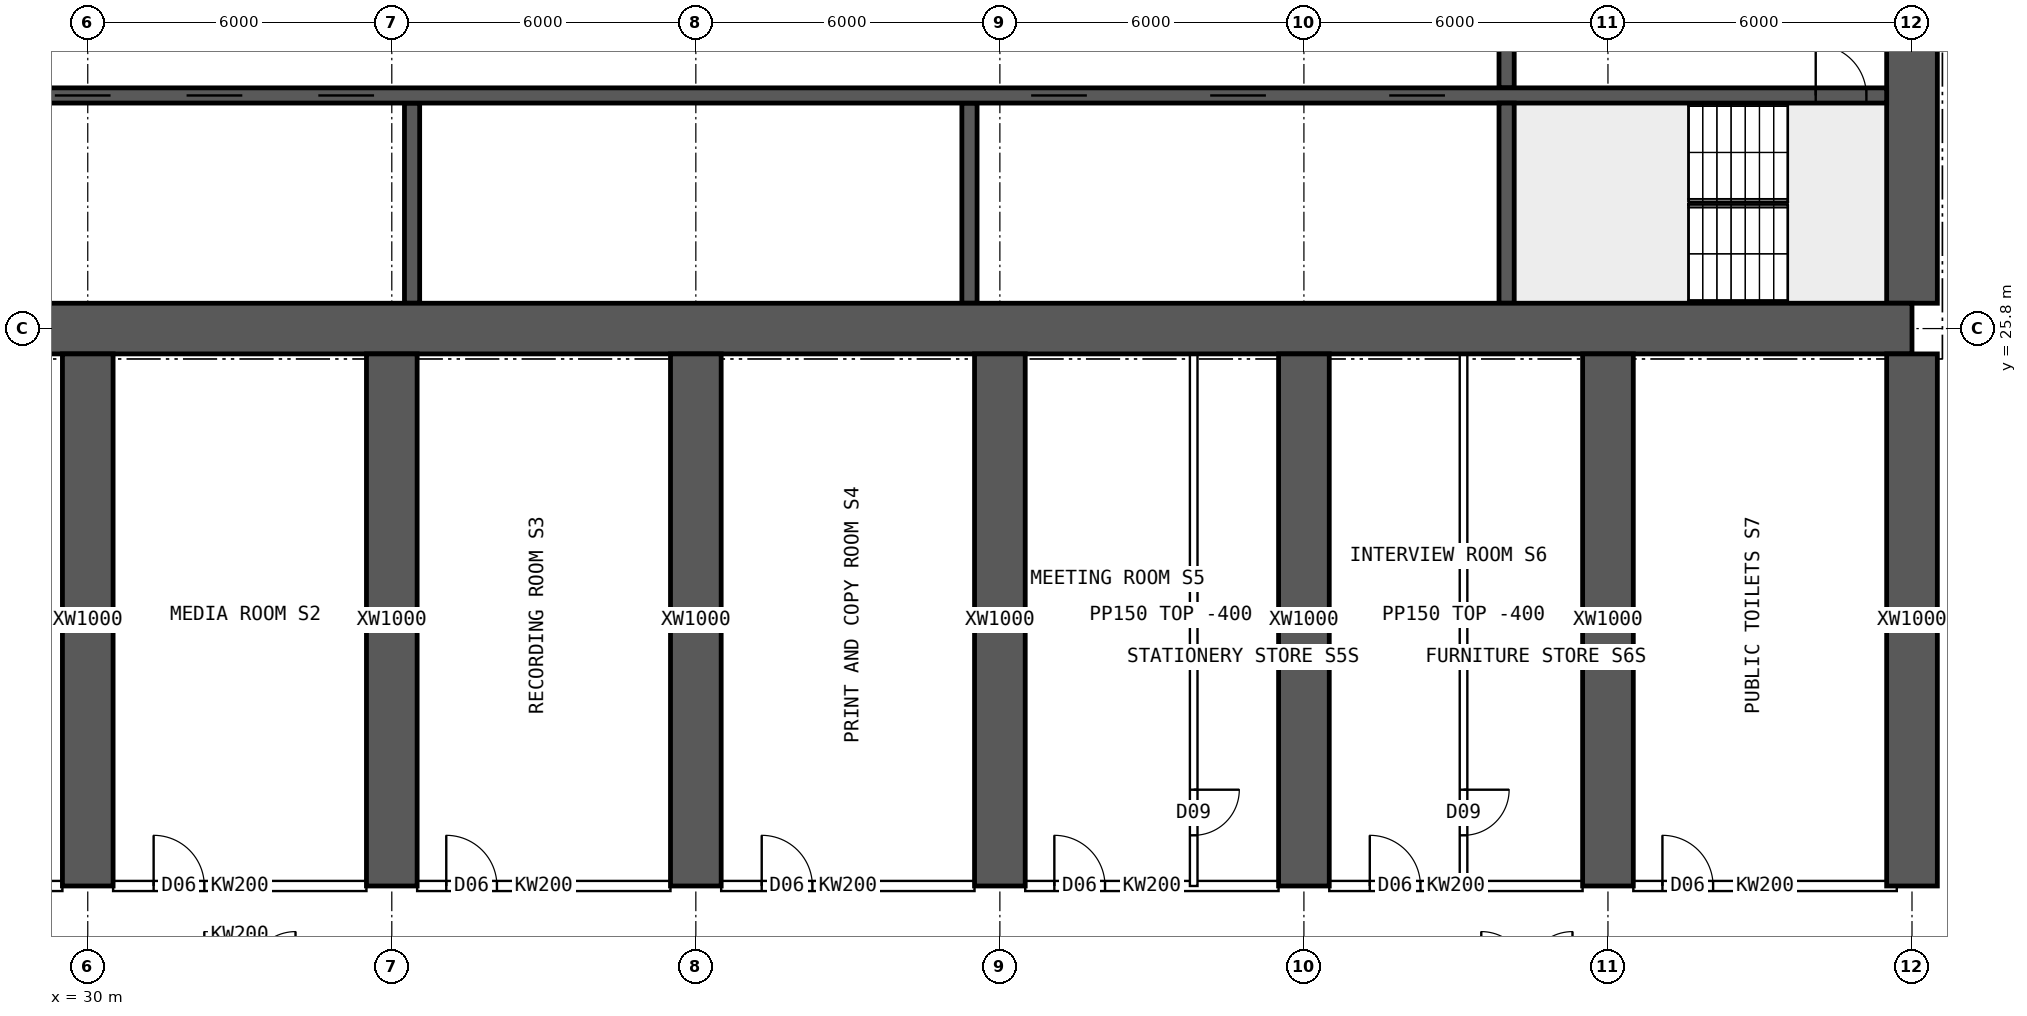
"""IFC4 building model, lengths in metres.
Left out: names, types, materials, properties, quantities, classifications, styles, units other than length and angle.
Written with IfcOpenShell. Run it as: python <this file> out.ifc"""

import sys

from ifc_helpers import new_model, si_unit, direction, frame, frame_2d, origin, place, context, subcontext, project, spatial, rectangle, extrude, element, fill, save


model = new_model("IFC4")
c1 = context("Model", 3, precision=1e-05, world=origin(), true_north=direction((0.0, 1.0)))
c2 = subcontext(c1, "Body", "Model", "MODEL_VIEW")
j1 = project(units=[si_unit("LENGTHUNIT", "METRE"), si_unit("PLANEANGLEUNIT", "RADIAN")], contexts=[c1])
p1 = place(None, origin())
s1 = spatial("IfcSite", under=j1, at=p1, CompositionType="ELEMENT")
p2 = place(p1, origin())
s2 = spatial("IfcBuilding", under=s1, at=p2, CompositionType="ELEMENT")
p3 = place(p2, frame((0.0, 0.0, 11.0)))
s3 = spatial("IfcBuildingStorey", under=s2, at=p3, CompositionType="ELEMENT", Elevation=11.0)
p4 = place(p3, frame((18.0, 25.8, 0.0), z_axis=(0.0, 0.0, 1.0), x_axis=(1.0, 0.0, 0.0)))
e1 = element("IfcWall", 1, at=p4, inside=s3, PredefinedType="SHEAR", context=c2, shape_type="SweptSolid", body=[
    extrude(rectangle(XDim=48.0, YDim=1.0, at=frame_2d((24.0, 0.0))), origin(), (0.0, 0.0, 1.0), 5.0),
])
p5 = place(p3, frame((66.0, 26.3, 0.0), z_axis=(0.0, 0.0, 1.0), x_axis=(0.0, 1.0, 0.0)))
e2 = element("IfcWall", 2, at=p5, inside=s3, PredefinedType="SHEAR", context=c2, shape_type="SweptSolid", body=[
    extrude(rectangle(XDim=11.4, YDim=1.0, at=frame_2d((5.7, 0.0))), origin(), (0.0, 0.0, 1.0), 5.0),
])
p6 = place(p5, frame((5.0, 0.0, 0.0)))
e3 = element("IfcOpeningElement", 3, at=p6, cuts=e2, PredefinedType="OPENING", context=c2, shape_type="SweptSolid", body=[
    extrude(rectangle(XDim=1.2, YDim=2.1, at=frame_2d((0.6, 1.05))), frame((0.0, 0.51, 0.0), z_axis=(0.0, -1.0, 0.0), x_axis=(1.0, 0.0, 0.0)), (0.0, 0.0, 1.0), 1.02),
])
p7 = place(p3, frame((18.5, 30.4, 0.0), z_axis=(0.0, 0.0, 1.0), x_axis=(1.0, 0.0, 0.0)))
e4 = element("IfcWall", 4, at=p7, inside=s3, PredefinedType="SHEAR", context=c2, shape_type="SweptSolid", body=[
    extrude(rectangle(XDim=47.0, YDim=0.3, at=frame_2d((23.5, 0.0))), origin(), (0.0, 0.0, 1.0), 5.0),
])
p8 = place(p7, frame((0.4, 0.0, 0.0)))
e5 = element("IfcOpeningElement", 5, at=p8, cuts=e4, PredefinedType="OPENING", context=c2, shape_type="SweptSolid", body=[
    extrude(rectangle(XDim=1.0, YDim=2.1, at=frame_2d((0.5, 1.05))), frame((0.0, 0.16, 0.0), z_axis=(0.0, -1.0, 0.0), x_axis=(1.0, 0.0, 0.0)), (0.0, 0.0, 1.0), 0.32),
])
p9 = place(p7, frame((45.6, 0.0, 0.0)))
e6 = element("IfcOpeningElement", 6, at=p9, cuts=e4, PredefinedType="OPENING", context=c2, shape_type="SweptSolid", body=[
    extrude(rectangle(XDim=1.0, YDim=2.1, at=frame_2d((0.5, 1.05))), frame((0.0, 0.16, 0.0), z_axis=(0.0, -1.0, 0.0), x_axis=(1.0, 0.0, 0.0)), (0.0, 0.0, 1.0), 0.32),
])
p10 = place(p7, frame((8.25, 0.0, 0.0)))
e7 = element("IfcOpeningElement", 7, at=p10, cuts=e4, PredefinedType="OPENING", context=c2, shape_type="SweptSolid", body=[
    extrude(rectangle(XDim=1.1, YDim=2.1, at=frame_2d((0.55, 1.05))), frame((0.0, 0.16, 0.0), z_axis=(0.0, -1.0, 0.0), x_axis=(1.0, 0.0, 0.0)), (0.0, 0.0, 1.0), 0.32),
])
p11 = place(p7, frame((10.85, 0.0, 0.0)))
e8 = element("IfcOpeningElement", 8, at=p11, cuts=e4, PredefinedType="OPENING", context=c2, shape_type="SweptSolid", body=[
    extrude(rectangle(XDim=1.1, YDim=2.1, at=frame_2d((0.55, 1.05))), frame((0.0, 0.16, 0.0), z_axis=(0.0, -1.0, 0.0), x_axis=(1.0, 0.0, 0.0)), (0.0, 0.0, 1.0), 0.32),
])
p12 = place(p7, frame((13.45, 0.0, 0.0)))
e9 = element("IfcOpeningElement", 9, at=p12, cuts=e4, PredefinedType="OPENING", context=c2, shape_type="SweptSolid", body=[
    extrude(rectangle(XDim=1.1, YDim=2.1, at=frame_2d((0.55, 1.05))), frame((0.0, 0.16, 0.0), z_axis=(0.0, -1.0, 0.0), x_axis=(1.0, 0.0, 0.0)), (0.0, 0.0, 1.0), 0.32),
])
p13 = place(p7, frame((16.05, 0.0, 0.0)))
e10 = element("IfcOpeningElement", 10, at=p13, cuts=e4, PredefinedType="OPENING", context=c2, shape_type="SweptSolid", body=[
    extrude(rectangle(XDim=1.1, YDim=2.1, at=frame_2d((0.55, 1.05))), frame((0.0, 0.16, 0.0), z_axis=(0.0, -1.0, 0.0), x_axis=(1.0, 0.0, 0.0)), (0.0, 0.0, 1.0), 0.32),
])
p14 = place(p7, frame((30.117, 0.0, 0.0)))
e11 = element("IfcOpeningElement", 11, at=p14, cuts=e4, PredefinedType="OPENING", context=c2, shape_type="SweptSolid", body=[
    extrude(rectangle(XDim=1.1, YDim=2.1, at=frame_2d((0.55, 1.05))), frame((0.0, 0.16, 0.0), z_axis=(0.0, -1.0, 0.0), x_axis=(1.0, 0.0, 0.0)), (0.0, 0.0, 1.0), 0.32),
])
p15 = place(p7, frame((33.65, 0.0, 0.0)))
e12 = element("IfcOpeningElement", 12, at=p15, cuts=e4, PredefinedType="OPENING", context=c2, shape_type="SweptSolid", body=[
    extrude(rectangle(XDim=1.1, YDim=2.1, at=frame_2d((0.55, 1.05))), frame((0.0, 0.16, 0.0), z_axis=(0.0, -1.0, 0.0), x_axis=(1.0, 0.0, 0.0)), (0.0, 0.0, 1.0), 0.32),
])
p16 = place(p7, frame((37.183, 0.0, 0.0)))
e13 = element("IfcOpeningElement", 13, at=p16, cuts=e4, PredefinedType="OPENING", context=c2, shape_type="SweptSolid", body=[
    extrude(rectangle(XDim=1.1, YDim=2.1, at=frame_2d((0.55, 1.05))), frame((0.0, 0.16, 0.0), z_axis=(0.0, -1.0, 0.0), x_axis=(1.0, 0.0, 0.0)), (0.0, 0.0, 1.0), 0.32),
])
p17 = place(p3, frame((58.0, 26.3, 0.0), z_axis=(0.0, 0.0, 1.0), x_axis=(0.0, 1.0, 0.0)))
e14 = element("IfcWall", 14, at=p17, inside=s3, PredefinedType="SHEAR", context=c2, shape_type="SweptSolid", body=[
    extrude(rectangle(XDim=3.95, YDim=0.3, at=frame_2d((1.975, 0.0))), origin(), (0.0, 0.0, 1.0), 5.0),
])
p18 = place(p3, frame((58.0, 30.55, 0.0), z_axis=(0.0, 0.0, 1.0), x_axis=(0.0, 1.0, 0.0)))
e15 = element("IfcWall", 15, at=p18, inside=s3, PredefinedType="SHEAR", context=c2, shape_type="SweptSolid", body=[
    extrude(rectangle(XDim=3.9, YDim=0.3, at=frame_2d((1.95, 0.0))), origin(), (0.0, 0.0, 1.0), 5.0),
])
p19 = place(p18, frame((1.4, 0.0, 0.0)))
e16 = element("IfcOpeningElement", 16, at=p19, cuts=e15, PredefinedType="OPENING", context=c2, shape_type="SweptSolid", body=[
    extrude(rectangle(XDim=1.2, YDim=2.1, at=frame_2d((0.6, 1.05))), frame((0.0, 0.16, 0.0), z_axis=(0.0, -1.0, 0.0), x_axis=(1.0, 0.0, 0.0)), (0.0, 0.0, 1.0), 0.32),
])
for number, where, z_axis, x_axis in (
    (17, (36.4, 26.3, 0.0), (0.0, 0.0, 1.0), (0.0, 1.0, 0.0)),
    (18, (47.4, 26.3, 0.0), (0.0, 0.0, 1.0), (0.0, 1.0, 0.0)),
):
    element("IfcWall", number, at=place(p3, frame(where, z_axis=z_axis, x_axis=x_axis)), inside=s3, PredefinedType="SHEAR", context=c2, shape_type="SweptSolid", body=[
        extrude(rectangle(XDim=3.95, YDim=0.3, at=frame_2d((1.975, 0.0))), origin(), (0.0, 0.0, 1.0), 5.0),
    ])
for number, where, z_axis, x_axis in (
    (19, (30.0, 14.8, 0.0), (0.0, 0.0, 1.0), (0.0, 1.0, 0.0)),
    (20, (36.0, 14.8, 0.0), (0.0, 0.0, 1.0), (0.0, 1.0, 0.0)),
    (21, (42.0, 14.8, 0.0), (0.0, 0.0, 1.0), (0.0, 1.0, 0.0)),
    (22, (48.0, 14.8, 0.0), (0.0, 0.0, 1.0), (0.0, 1.0, 0.0)),
    (23, (54.0, 14.8, 0.0), (0.0, 0.0, 1.0), (0.0, 1.0, 0.0)),
    (24, (60.0, 14.8, 0.0), (0.0, 0.0, 1.0), (0.0, 1.0, 0.0)),
    (25, (66.0, 14.8, 0.0), (0.0, 0.0, 1.0), (0.0, 1.0, 0.0)),
):
    element("IfcWall", number, at=place(p3, frame(where, z_axis=z_axis, x_axis=x_axis)), inside=s3, PredefinedType="SHEAR", context=c2, shape_type="SweptSolid", body=[
        extrude(rectangle(XDim=10.5, YDim=1.0, at=frame_2d((5.25, 0.0))), origin(), (0.0, 0.0, 1.0), 5.0),
    ])
p20 = place(p3, frame((51.825, 14.8, 0.0), z_axis=(0.0, 0.0, 1.0), x_axis=(0.0, 1.0, 0.0)))
e26 = element("IfcWall", 26, at=p20, inside=s3, PredefinedType="PARTITIONING", context=c2, shape_type="SweptSolid", body=[
    extrude(rectangle(XDim=10.7, YDim=0.15, at=frame_2d((5.35, 0.0))), origin(), (0.0, 0.0, 1.0), 4.6),
])
p21 = place(p20, frame((1.0, 0.0, 0.0)))
e27 = element("IfcOpeningElement", 27, at=p21, cuts=e26, PredefinedType="OPENING", context=c2, shape_type="SweptSolid", body=[
    extrude(rectangle(XDim=0.9, YDim=2.1, at=frame_2d((0.45, 1.05))), frame((0.0, 0.085, 0.0), z_axis=(0.0, -1.0, 0.0), x_axis=(1.0, 0.0, 0.0)), (0.0, 0.0, 1.0), 0.17),
])
p22 = place(p3, frame((57.15, 14.8, 0.0), z_axis=(0.0, 0.0, 1.0), x_axis=(0.0, 1.0, 0.0)))
e28 = element("IfcWall", 28, at=p22, inside=s3, PredefinedType="PARTITIONING", context=c2, shape_type="SweptSolid", body=[
    extrude(rectangle(XDim=10.7, YDim=0.15, at=frame_2d((5.35, 0.0))), origin(), (0.0, 0.0, 1.0), 4.6),
])
p23 = place(p22, frame((1.0, 0.0, 0.0)))
e29 = element("IfcOpeningElement", 29, at=p23, cuts=e28, PredefinedType="OPENING", context=c2, shape_type="SweptSolid", body=[
    extrude(rectangle(XDim=0.9, YDim=2.1, at=frame_2d((0.45, 1.05))), frame((0.0, 0.085, 0.0), z_axis=(0.0, -1.0, 0.0), x_axis=(1.0, 0.0, 0.0)), (0.0, 0.0, 1.0), 0.17),
])
p24 = place(p3, frame((24.5, 14.8, 0.0), z_axis=(0.0, 0.0, 1.0), x_axis=(1.0, 0.0, 0.0)))
e30 = element("IfcWall", 30, at=p24, inside=s3, PredefinedType="SOLIDWALL", context=c2, shape_type="SweptSolid", body=[
    extrude(rectangle(XDim=5.0, YDim=0.2, at=frame_2d((2.5, 0.0))), origin(), (0.0, 0.0, 1.0), 4.6),
])
p25 = place(p24, frame((0.575, 0.0, 0.0)))
e31 = element("IfcOpeningElement", 31, at=p25, cuts=e30, PredefinedType="OPENING", context=c2, shape_type="SweptSolid", body=[
    extrude(rectangle(XDim=1.0, YDim=2.1, at=frame_2d((0.5, 1.05))), frame((0.0, 0.11, 0.0), z_axis=(0.0, -1.0, 0.0), x_axis=(1.0, 0.0, 0.0)), (0.0, 0.0, 1.0), 0.22),
])
p26 = place(p3, frame((30.5, 14.8, 0.0), z_axis=(0.0, 0.0, 1.0), x_axis=(1.0, 0.0, 0.0)))
e32 = element("IfcWall", 32, at=p26, inside=s3, PredefinedType="SOLIDWALL", context=c2, shape_type="SweptSolid", body=[
    extrude(rectangle(XDim=5.0, YDim=0.2, at=frame_2d((2.5, 0.0))), origin(), (0.0, 0.0, 1.0), 4.6),
])
p27 = place(p26, frame((0.8, 0.0, 0.0)))
e33 = element("IfcOpeningElement", 33, at=p27, cuts=e32, PredefinedType="OPENING", context=c2, shape_type="SweptSolid", body=[
    extrude(rectangle(XDim=1.0, YDim=2.1, at=frame_2d((0.5, 1.05))), frame((0.0, 0.11, 0.0), z_axis=(0.0, -1.0, 0.0), x_axis=(1.0, 0.0, 0.0)), (0.0, 0.0, 1.0), 0.22),
])
p28 = place(p3, frame((36.5, 14.8, 0.0), z_axis=(0.0, 0.0, 1.0), x_axis=(1.0, 0.0, 0.0)))
e34 = element("IfcWall", 34, at=p28, inside=s3, PredefinedType="SOLIDWALL", context=c2, shape_type="SweptSolid", body=[
    extrude(rectangle(XDim=5.0, YDim=0.2, at=frame_2d((2.5, 0.0))), origin(), (0.0, 0.0, 1.0), 4.6),
])
p29 = place(p28, frame((0.575, 0.0, 0.0)))
e35 = element("IfcOpeningElement", 35, at=p29, cuts=e34, PredefinedType="OPENING", context=c2, shape_type="SweptSolid", body=[
    extrude(rectangle(XDim=1.0, YDim=2.1, at=frame_2d((0.5, 1.05))), frame((0.0, 0.11, 0.0), z_axis=(0.0, -1.0, 0.0), x_axis=(1.0, 0.0, 0.0)), (0.0, 0.0, 1.0), 0.22),
])
p30 = place(p3, frame((42.5, 14.8, 0.0), z_axis=(0.0, 0.0, 1.0), x_axis=(1.0, 0.0, 0.0)))
e36 = element("IfcWall", 36, at=p30, inside=s3, PredefinedType="SOLIDWALL", context=c2, shape_type="SweptSolid", body=[
    extrude(rectangle(XDim=5.0, YDim=0.2, at=frame_2d((2.5, 0.0))), origin(), (0.0, 0.0, 1.0), 4.6),
])
p31 = place(p30, frame((0.8, 0.0, 0.0)))
e37 = element("IfcOpeningElement", 37, at=p31, cuts=e36, PredefinedType="OPENING", context=c2, shape_type="SweptSolid", body=[
    extrude(rectangle(XDim=1.0, YDim=2.1, at=frame_2d((0.5, 1.05))), frame((0.0, 0.11, 0.0), z_axis=(0.0, -1.0, 0.0), x_axis=(1.0, 0.0, 0.0)), (0.0, 0.0, 1.0), 0.22),
])
p32 = place(p3, frame((48.5, 14.8, 0.0), z_axis=(0.0, 0.0, 1.0), x_axis=(1.0, 0.0, 0.0)))
e38 = element("IfcWall", 38, at=p32, inside=s3, PredefinedType="SOLIDWALL", context=c2, shape_type="SweptSolid", body=[
    extrude(rectangle(XDim=5.0, YDim=0.2, at=frame_2d((2.5, 0.0))), origin(), (0.0, 0.0, 1.0), 4.6),
])
p33 = place(p32, frame((0.575, 0.0, 0.0)))
e39 = element("IfcOpeningElement", 39, at=p33, cuts=e38, PredefinedType="OPENING", context=c2, shape_type="SweptSolid", body=[
    extrude(rectangle(XDim=1.0, YDim=2.1, at=frame_2d((0.5, 1.05))), frame((0.0, 0.11, 0.0), z_axis=(0.0, -1.0, 0.0), x_axis=(1.0, 0.0, 0.0)), (0.0, 0.0, 1.0), 0.22),
])
p34 = place(p3, frame((54.5, 14.8, 0.0), z_axis=(0.0, 0.0, 1.0), x_axis=(1.0, 0.0, 0.0)))
e40 = element("IfcWall", 40, at=p34, inside=s3, PredefinedType="SOLIDWALL", context=c2, shape_type="SweptSolid", body=[
    extrude(rectangle(XDim=5.0, YDim=0.2, at=frame_2d((2.5, 0.0))), origin(), (0.0, 0.0, 1.0), 4.6),
])
p35 = place(p34, frame((0.8, 0.0, 0.0)))
e41 = element("IfcOpeningElement", 41, at=p35, cuts=e40, PredefinedType="OPENING", context=c2, shape_type="SweptSolid", body=[
    extrude(rectangle(XDim=1.0, YDim=2.1, at=frame_2d((0.5, 1.05))), frame((0.0, 0.11, 0.0), z_axis=(0.0, -1.0, 0.0), x_axis=(1.0, 0.0, 0.0)), (0.0, 0.0, 1.0), 0.22),
])
p36 = place(p3, frame((60.5, 14.8, 0.0), z_axis=(0.0, 0.0, 1.0), x_axis=(1.0, 0.0, 0.0)))
e42 = element("IfcWall", 42, at=p36, inside=s3, PredefinedType="SOLIDWALL", context=c2, shape_type="SweptSolid", body=[
    extrude(rectangle(XDim=5.2, YDim=0.2, at=frame_2d((2.6, 0.0))), origin(), (0.0, 0.0, 1.0), 4.6),
])
p37 = place(p36, frame((0.575, 0.0, 0.0)))
e43 = element("IfcOpeningElement", 43, at=p37, cuts=e42, PredefinedType="OPENING", context=c2, shape_type="SweptSolid", body=[
    extrude(rectangle(XDim=1.0, YDim=2.1, at=frame_2d((0.5, 1.05))), frame((0.0, 0.11, 0.0), z_axis=(0.0, -1.0, 0.0), x_axis=(1.0, 0.0, 0.0)), (0.0, 0.0, 1.0), 0.22),
])
p38 = place(p9, origin())
e44 = element("IfcDoor", 44, at=p38, inside=s3, OperationType="SINGLE_SWING_LEFT", PredefinedType="DOOR", context=c2, shape_type="SweptSolid", body=[
    extrude(rectangle(XDim=1.0, YDim=2.1, at=frame_2d((0.5, 1.05))), frame((0.0, 0.025, 0.0), z_axis=(0.0, -1.0, 0.0), x_axis=(1.0, 0.0, 0.0)), (0.0, 0.0, 1.0), 0.05),
])
fill(e6, e44)
p39 = place(p11, origin())
e45 = element("IfcDoor", 45, at=p39, inside=s3, OperationType="DOUBLE_DOOR_SLIDING", PredefinedType="DOOR", context=c2, shape_type="SweptSolid", body=[
    extrude(rectangle(XDim=1.1, YDim=2.1, at=frame_2d((0.55, 1.05))), frame((0.0, 0.025, 0.0), z_axis=(0.0, -1.0, 0.0), x_axis=(1.0, 0.0, 0.0)), (0.0, 0.0, 1.0), 0.05),
])
fill(e8, e45)
p40 = place(p12, origin())
e46 = element("IfcDoor", 46, at=p40, inside=s3, OperationType="DOUBLE_DOOR_SLIDING", PredefinedType="DOOR", context=c2, shape_type="SweptSolid", body=[
    extrude(rectangle(XDim=1.1, YDim=2.1, at=frame_2d((0.55, 1.05))), frame((0.0, 0.025, 0.0), z_axis=(0.0, -1.0, 0.0), x_axis=(1.0, 0.0, 0.0)), (0.0, 0.0, 1.0), 0.05),
])
fill(e9, e46)
p41 = place(p13, origin())
e47 = element("IfcDoor", 47, at=p41, inside=s3, OperationType="DOUBLE_DOOR_SLIDING", PredefinedType="DOOR", context=c2, shape_type="SweptSolid", body=[
    extrude(rectangle(XDim=1.1, YDim=2.1, at=frame_2d((0.55, 1.05))), frame((0.0, 0.025, 0.0), z_axis=(0.0, -1.0, 0.0), x_axis=(1.0, 0.0, 0.0)), (0.0, 0.0, 1.0), 0.05),
])
fill(e10, e47)
p42 = place(p14, origin())
e48 = element("IfcDoor", 48, at=p42, inside=s3, OperationType="DOUBLE_DOOR_SLIDING", PredefinedType="DOOR", context=c2, shape_type="SweptSolid", body=[
    extrude(rectangle(XDim=1.1, YDim=2.1, at=frame_2d((0.55, 1.05))), frame((0.0, 0.025, 0.0), z_axis=(0.0, -1.0, 0.0), x_axis=(1.0, 0.0, 0.0)), (0.0, 0.0, 1.0), 0.05),
])
fill(e11, e48)
p43 = place(p15, origin())
e49 = element("IfcDoor", 49, at=p43, inside=s3, OperationType="DOUBLE_DOOR_SLIDING", PredefinedType="DOOR", context=c2, shape_type="SweptSolid", body=[
    extrude(rectangle(XDim=1.1, YDim=2.1, at=frame_2d((0.55, 1.05))), frame((0.0, 0.025, 0.0), z_axis=(0.0, -1.0, 0.0), x_axis=(1.0, 0.0, 0.0)), (0.0, 0.0, 1.0), 0.05),
])
fill(e12, e49)
p44 = place(p16, origin())
e50 = element("IfcDoor", 50, at=p44, inside=s3, OperationType="DOUBLE_DOOR_SLIDING", PredefinedType="DOOR", context=c2, shape_type="SweptSolid", body=[
    extrude(rectangle(XDim=1.1, YDim=2.1, at=frame_2d((0.55, 1.05))), frame((0.0, 0.025, 0.0), z_axis=(0.0, -1.0, 0.0), x_axis=(1.0, 0.0, 0.0)), (0.0, 0.0, 1.0), 0.05),
])
fill(e13, e50)
p45 = place(p21, origin())
e51 = element("IfcDoor", 51, at=p45, inside=s3, OperationType="SINGLE_SWING_RIGHT", PredefinedType="DOOR", context=c2, shape_type="SweptSolid", body=[
    extrude(rectangle(XDim=0.9, YDim=2.1, at=frame_2d((0.45, 1.05))), frame((0.0, 0.025, 0.0), z_axis=(0.0, -1.0, 0.0), x_axis=(1.0, 0.0, 0.0)), (0.0, 0.0, 1.0), 0.05),
])
fill(e27, e51)
p46 = place(p23, origin())
e52 = element("IfcDoor", 52, at=p46, inside=s3, OperationType="SINGLE_SWING_RIGHT", PredefinedType="DOOR", context=c2, shape_type="SweptSolid", body=[
    extrude(rectangle(XDim=0.9, YDim=2.1, at=frame_2d((0.45, 1.05))), frame((0.0, 0.025, 0.0), z_axis=(0.0, -1.0, 0.0), x_axis=(1.0, 0.0, 0.0)), (0.0, 0.0, 1.0), 0.05),
])
fill(e29, e52)
p47 = place(p27, origin())
e53 = element("IfcDoor", 53, at=p47, inside=s3, OperationType="SINGLE_SWING_LEFT", PredefinedType="DOOR", context=c2, shape_type="SweptSolid", body=[
    extrude(rectangle(XDim=1.0, YDim=2.1, at=frame_2d((0.5, 1.05))), frame((0.0, 0.025, 0.0), z_axis=(0.0, -1.0, 0.0), x_axis=(1.0, 0.0, 0.0)), (0.0, 0.0, 1.0), 0.05),
])
fill(e33, e53)
p48 = place(p29, origin())
e54 = element("IfcDoor", 54, at=p48, inside=s3, OperationType="SINGLE_SWING_LEFT", PredefinedType="DOOR", context=c2, shape_type="SweptSolid", body=[
    extrude(rectangle(XDim=1.0, YDim=2.1, at=frame_2d((0.5, 1.05))), frame((0.0, 0.025, 0.0), z_axis=(0.0, -1.0, 0.0), x_axis=(1.0, 0.0, 0.0)), (0.0, 0.0, 1.0), 0.05),
])
fill(e35, e54)
p49 = place(p31, origin())
e55 = element("IfcDoor", 55, at=p49, inside=s3, OperationType="SINGLE_SWING_LEFT", PredefinedType="DOOR", context=c2, shape_type="SweptSolid", body=[
    extrude(rectangle(XDim=1.0, YDim=2.1, at=frame_2d((0.5, 1.05))), frame((0.0, 0.025, 0.0), z_axis=(0.0, -1.0, 0.0), x_axis=(1.0, 0.0, 0.0)), (0.0, 0.0, 1.0), 0.05),
])
fill(e37, e55)
p50 = place(p33, origin())
e56 = element("IfcDoor", 56, at=p50, inside=s3, OperationType="SINGLE_SWING_LEFT", PredefinedType="DOOR", context=c2, shape_type="SweptSolid", body=[
    extrude(rectangle(XDim=1.0, YDim=2.1, at=frame_2d((0.5, 1.05))), frame((0.0, 0.025, 0.0), z_axis=(0.0, -1.0, 0.0), x_axis=(1.0, 0.0, 0.0)), (0.0, 0.0, 1.0), 0.05),
])
fill(e39, e56)
p51 = place(p35, origin())
e57 = element("IfcDoor", 57, at=p51, inside=s3, OperationType="SINGLE_SWING_LEFT", PredefinedType="DOOR", context=c2, shape_type="SweptSolid", body=[
    extrude(rectangle(XDim=1.0, YDim=2.1, at=frame_2d((0.5, 1.05))), frame((0.0, 0.025, 0.0), z_axis=(0.0, -1.0, 0.0), x_axis=(1.0, 0.0, 0.0)), (0.0, 0.0, 1.0), 0.05),
])
fill(e41, e57)
p52 = place(p37, origin())
e58 = element("IfcDoor", 58, at=p52, inside=s3, OperationType="SINGLE_SWING_LEFT", PredefinedType="DOOR", context=c2, shape_type="SweptSolid", body=[
    extrude(rectangle(XDim=1.0, YDim=2.1, at=frame_2d((0.5, 1.05))), frame((0.0, 0.025, 0.0), z_axis=(0.0, -1.0, 0.0), x_axis=(1.0, 0.0, 0.0)), (0.0, 0.0, 1.0), 0.05),
])
fill(e43, e58)
save(model, sys.argv[1])
